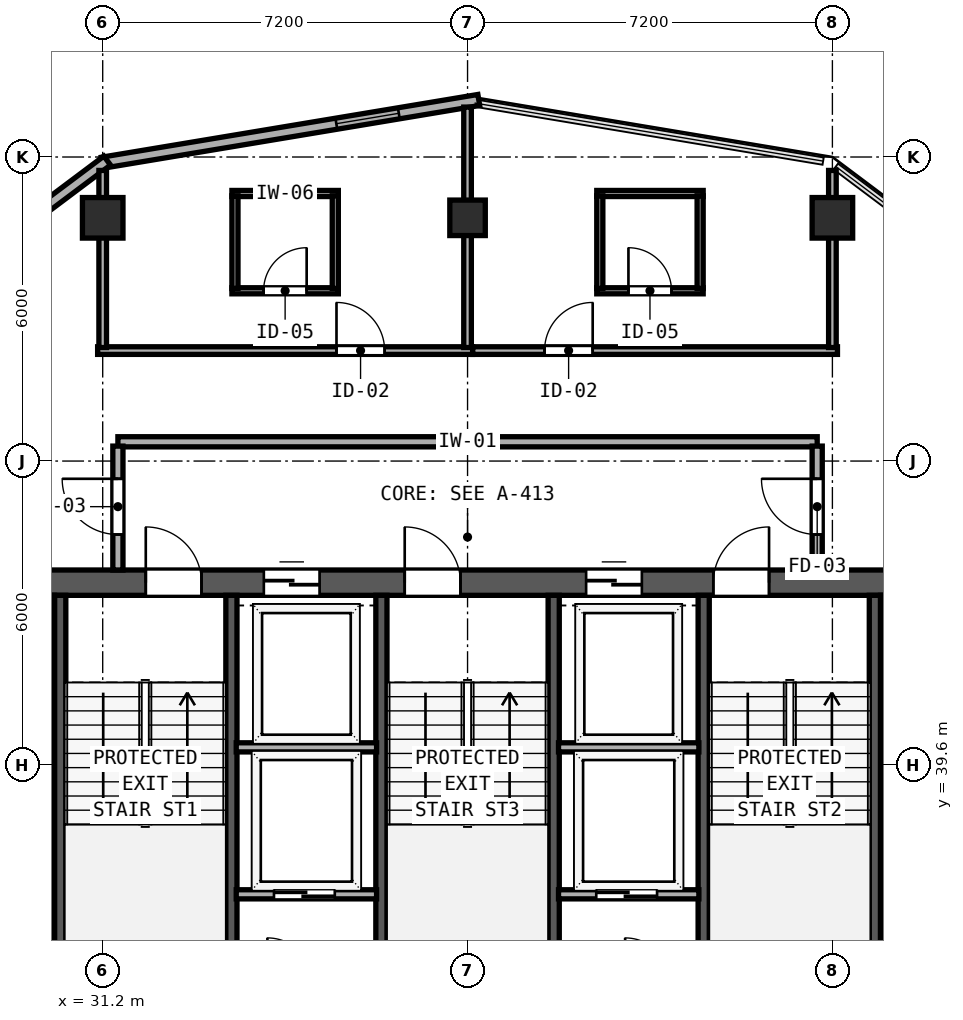
"""IFC4 building model, lengths in metres.
Left out: names, types, materials, properties, quantities, classifications, styles, units other than length and angle.
Written with IfcOpenShell. Run it as: python <this file> out.ifc"""

import sys

from ifc_helpers import new_model, si_unit, direction, frame, frame_2d, origin, origin_2d, place, context, subcontext, project, spatial, rectangle, hollow_rectangle, extrude, element, fill, save


model = new_model("IFC4")
c1 = context("Model", 3, precision=1e-05, world=origin(), true_north=direction((0.0, 1.0)))
c2 = subcontext(c1, "Body", "Model", "MODEL_VIEW")
j1 = project(units=[si_unit("LENGTHUNIT", "METRE"), si_unit("PLANEANGLEUNIT", "RADIAN")], contexts=[c1])
p1 = place(None, origin())
s1 = spatial("IfcSite", under=j1, at=p1, CompositionType="ELEMENT")
p2 = place(p1, origin())
s2 = spatial("IfcBuilding", under=s1, at=p2, CompositionType="ELEMENT")
p3 = place(p2, frame((0.0, 0.0, 258.3)))
s3 = spatial("IfcBuildingStorey", under=s2, at=p3, CompositionType="ELEMENT", Elevation=258.3)
p4 = place(p3, frame((29.75, 43.2, 0.0), z_axis=(0.0, 0.0, 1.0), x_axis=(1.0, 0.0, 0.0)))
e1 = element("IfcWall", 1, at=p4, inside=s3, PredefinedType="SHEAR", context=c2, shape_type="SweptSolid", body=[
    extrude(rectangle(XDim=17.3, YDim=0.5, at=frame_2d((8.65, 0.0))), origin(), (0.0, 0.0, 1.0), 3.67),
])
p5 = place(p4, frame((2.3, 0.0, 0.0)))
e2 = element("IfcOpeningElement", 2, at=p5, cuts=e1, PredefinedType="OPENING", context=c2, shape_type="SweptSolid", body=[
    extrude(rectangle(XDim=1.1, YDim=2.15, at=frame_2d((0.55, 1.075))), frame((0.0, 0.26, 0.0), z_axis=(0.0, -1.0, 0.0), x_axis=(1.0, 0.0, 0.0)), (0.0, 0.0, 1.0), 0.52),
])
p6 = place(p4, frame((7.41, 0.0, 0.0)))
e3 = element("IfcOpeningElement", 3, at=p6, cuts=e1, PredefinedType="OPENING", context=c2, shape_type="SweptSolid", body=[
    extrude(rectangle(XDim=1.1, YDim=2.15, at=frame_2d((0.55, 1.075))), frame((0.0, 0.26, 0.0), z_axis=(0.0, -1.0, 0.0), x_axis=(1.0, 0.0, 0.0)), (0.0, 0.0, 1.0), 0.52),
])
p7 = place(p4, frame((13.5, 0.0, 0.0)))
e4 = element("IfcOpeningElement", 4, at=p7, cuts=e1, PredefinedType="OPENING", context=c2, shape_type="SweptSolid", body=[
    extrude(rectangle(XDim=1.1, YDim=2.15, at=frame_2d((0.55, 1.075))), frame((0.0, 0.26, 0.0), z_axis=(0.0, -1.0, 0.0), x_axis=(1.0, 0.0, 0.0)), (0.0, 0.0, 1.0), 0.52),
])
p8 = place(p4, frame((4.63, 0.0, 0.0)))
e5 = element("IfcOpeningElement", 5, at=p8, cuts=e1, PredefinedType="OPENING", context=c2, shape_type="SweptSolid", body=[
    extrude(rectangle(XDim=1.1, YDim=2.2, at=frame_2d((0.55, 1.1))), frame((0.0, 0.26, 0.0), z_axis=(0.0, -1.0, 0.0), x_axis=(1.0, 0.0, 0.0)), (0.0, 0.0, 1.0), 0.52),
])
p9 = place(p4, frame((10.99, 0.0, 0.0)))
e6 = element("IfcOpeningElement", 6, at=p9, cuts=e1, PredefinedType="OPENING", context=c2, shape_type="SweptSolid", body=[
    extrude(rectangle(XDim=1.1, YDim=2.2, at=frame_2d((0.55, 1.1))), frame((0.0, 0.26, 0.0), z_axis=(0.0, -1.0, 0.0), x_axis=(1.0, 0.0, 0.0)), (0.0, 0.0, 1.0), 0.52),
])
for number, where, z_axis, x_axis in (
    (7, (30.0, 32.8, 0.0), (0.0, 0.0, 1.0), (0.0, 1.0, 0.0)),
    (8, (46.8, 32.8, 0.0), (0.0, 0.0, 1.0), (0.0, 1.0, 0.0)),
):
    element("IfcWall", number, at=place(p3, frame(where, z_axis=z_axis, x_axis=x_axis)), inside=s3, PredefinedType="SHEAR", context=c2, shape_type="SweptSolid", body=[
        extrude(rectangle(XDim=10.15, YDim=0.5, at=frame_2d((5.075, 0.0))), origin(), (0.0, 0.0, 1.0), 3.67),
    ])
for number, where, z_axis, x_axis in (
    (9, (30.362, 35.39, 0.0), (0.0, 0.0, 1.0), (0.0, 1.0, 0.0)),
    (10, (33.74, 35.39, 0.0), (0.0, 0.0, 1.0), (0.0, 1.0, 0.0)),
    (11, (36.7, 35.39, 0.0), (0.0, 0.0, 1.0), (0.0, 1.0, 0.0)),
    (12, (40.1, 35.39, 0.0), (0.0, 0.0, 1.0), (0.0, 1.0, 0.0)),
    (13, (43.06, 35.39, 0.0), (0.0, 0.0, 1.0), (0.0, 1.0, 0.0)),
    (14, (46.438, 35.39, 0.0), (0.0, 0.0, 1.0), (0.0, 1.0, 0.0)),
):
    element("IfcWall", number, at=place(p3, frame(where, z_axis=z_axis, x_axis=x_axis)), inside=s3, PredefinedType="SHEAR", context=c2, shape_type="SweptSolid", body=[
        extrude(rectangle(XDim=7.56, YDim=0.22, at=frame_2d((3.78, 0.0))), origin(), (0.0, 0.0, 1.0), 3.67),
    ])
for number, where, z_axis, x_axis in (
    (15, (31.2, 50.4, 0.0), (0.0, 0.0, 1.0), (1.0, 0.0, 0.0)),
    (16, (45.6, 50.4, 0.0), (0.0, 0.0, 1.0), (1.0, 0.0, 0.0)),
):
    element("IfcColumn", number, at=place(p3, frame(where, z_axis=z_axis, x_axis=x_axis)), inside=s3, PredefinedType="COLUMN", context=c2, shape_type="SweptSolid", body=[
        extrude(hollow_rectangle(XDim=0.8, YDim=0.8, WallThickness=0.03, at=origin_2d()), origin(), (0.0, 0.0, 1.0), 3.85),
    ])
p10 = place(p3, frame((38.4, 50.4, 0.0), z_axis=(0.0, 0.0, 1.0), x_axis=(1.0, 0.0, 0.0)))
e17 = element("IfcColumn", 17, at=p10, inside=s3, PredefinedType="COLUMN", context=c2, shape_type="SweptSolid", body=[
    extrude(hollow_rectangle(XDim=0.7, YDim=0.7, WallThickness=0.026, at=origin_2d()), origin(), (0.0, 0.0, 1.0), 3.85),
])
p11 = place(p3, frame((38.622, 52.726, 0.0), z_axis=(0.0, 0.0, 1.0), x_axis=(-0.986390420428, -0.164420006349, 0.0)))
e18 = element("IfcWall", 18, at=p11, inside=s3, PredefinedType="SOLIDWALL", context=c2, shape_type="SweptSolid", body=[
    extrude(rectangle(XDim=7.534, YDim=0.22, at=frame_2d((3.767, 0.0))), origin(), (0.0, 0.0, 1.0), 3.67),
])
p12 = place(p11, frame((1.6, 0.0, 0.85)))
e19 = element("IfcOpeningElement", 19, at=p12, cuts=e18, PredefinedType="OPENING", context=c2, shape_type="SweptSolid", body=[
    extrude(rectangle(XDim=1.25, YDim=1.95, at=frame_2d((0.625, 0.975))), frame((0.0, 0.12, 0.0), z_axis=(0.0, -1.0, 0.0), x_axis=(1.0, 0.0, 0.0)), (0.0, 0.0, 1.0), 0.24),
])
p13 = place(p3, frame((31.289, 51.529, 0.0), z_axis=(0.0, 0.0, 1.0), x_axis=(-0.800014580093, -0.599980559383, 0.0)))
e20 = element("IfcWall", 20, at=p13, inside=s3, PredefinedType="SOLIDWALL", context=c2, shape_type="SweptSolid", body=[
    extrude(rectangle(XDim=6.028, YDim=0.22, at=frame_2d((3.014, 0.0))), origin(), (0.0, 0.0, 1.0), 3.67),
])
p14 = place(p13, frame((1.6, 0.0, 0.85)))
e21 = element("IfcOpeningElement", 21, at=p14, cuts=e20, PredefinedType="OPENING", context=c2, shape_type="SweptSolid", body=[
    extrude(rectangle(XDim=1.25, YDim=1.95, at=frame_2d((0.625, 0.975))), frame((0.0, 0.12, 0.0), z_axis=(0.0, -1.0, 0.0), x_axis=(1.0, 0.0, 0.0)), (0.0, 0.0, 1.0), 0.24),
])
p15 = place(p3, frame((31.5, 45.98, 0.0), z_axis=(0.0, 0.0, 1.0), x_axis=(1.0, 0.0, 0.0)))
e22 = element("IfcWall", 22, at=p15, inside=s3, PredefinedType="SOLIDWALL", context=c2, shape_type="SweptSolid", body=[
    extrude(rectangle(XDim=13.8, YDim=0.2, at=frame_2d((6.9, 0.0))), origin(), (0.0, 0.0, 1.0), 3.67),
])
p16 = place(p3, frame((31.5, 43.45, 0.0), z_axis=(0.0, 0.0, 1.0), x_axis=(0.0, 1.0, 0.0)))
e23 = element("IfcWall", 23, at=p16, inside=s3, PredefinedType="SOLIDWALL", context=c2, shape_type="SweptSolid", body=[
    extrude(rectangle(XDim=2.445, YDim=0.2, at=frame_2d((1.223, 0.0))), origin(), (0.0, 0.0, 1.0), 3.67),
])
p17 = place(p16, frame((1.8, 0.0, 0.0), z_axis=(0.0, 0.0, 1.0), x_axis=(-1.0, 0.0, 0.0)))
e24 = element("IfcOpeningElement", 24, at=p17, cuts=e23, PredefinedType="OPENING", context=c2, shape_type="SweptSolid", body=[
    extrude(rectangle(XDim=1.1, YDim=2.15, at=frame_2d((0.55, 1.075))), frame((0.0, 0.11, 0.0), z_axis=(0.0, -1.0, 0.0), x_axis=(1.0, 0.0, 0.0)), (0.0, 0.0, 1.0), 0.22),
])
p18 = place(p3, frame((45.3, 43.45, 0.0), z_axis=(0.0, 0.0, 1.0), x_axis=(0.0, 1.0, 0.0)))
e25 = element("IfcWall", 25, at=p18, inside=s3, PredefinedType="SOLIDWALL", context=c2, shape_type="SweptSolid", body=[
    extrude(rectangle(XDim=2.445, YDim=0.2, at=frame_2d((1.223, 0.0))), origin(), (0.0, 0.0, 1.0), 3.67),
])
p19 = place(p18, frame((0.7, 0.0, 0.0)))
e26 = element("IfcOpeningElement", 26, at=p19, cuts=e25, PredefinedType="OPENING", context=c2, shape_type="SweptSolid", body=[
    extrude(rectangle(XDim=1.1, YDim=2.15, at=frame_2d((0.55, 1.075))), frame((0.0, 0.11, 0.0), z_axis=(0.0, -1.0, 0.0), x_axis=(1.0, 0.0, 0.0)), (0.0, 0.0, 1.0), 0.22),
])
for number, where, z_axis, x_axis in (
    (27, (33.835, 39.95, 0.0), (0.0, 0.0, 1.0), (1.0, 0.0, 0.0)),
    (28, (40.195, 39.95, 0.0), (0.0, 0.0, 1.0), (1.0, 0.0, 0.0)),
):
    element("IfcWall", number, at=place(p3, frame(where, z_axis=z_axis, x_axis=x_axis)), inside=s3, PredefinedType="SOLIDWALL", context=c2, shape_type="SweptSolid", body=[
        extrude(rectangle(XDim=2.77, YDim=0.18, at=frame_2d((1.385, 0.0))), origin(), (0.0, 0.0, 1.0), 3.67),
    ])
p20 = place(p3, frame((33.835, 37.05, 0.0), z_axis=(0.0, 0.0, 1.0), x_axis=(1.0, 0.0, 0.0)))
e29 = element("IfcWall", 29, at=p20, inside=s3, PredefinedType="SOLIDWALL", context=c2, shape_type="SweptSolid", body=[
    extrude(rectangle(XDim=2.77, YDim=0.18, at=frame_2d((1.385, 0.0))), origin(), (0.0, 0.0, 1.0), 3.67),
])
p21 = place(p20, frame((1.945, 0.0, 0.0), z_axis=(0.0, 0.0, 1.0), x_axis=(-1.0, 0.0, 0.0)))
e30 = element("IfcOpeningElement", 30, at=p21, cuts=e29, PredefinedType="OPENING", context=c2, shape_type="SweptSolid", body=[
    extrude(rectangle(XDim=1.2, YDim=2.2, at=frame_2d((0.6, 1.1))), frame((0.0, 0.1, 0.0), z_axis=(0.0, -1.0, 0.0), x_axis=(1.0, 0.0, 0.0)), (0.0, 0.0, 1.0), 0.2),
])
p22 = place(p3, frame((40.195, 37.05, 0.0), z_axis=(0.0, 0.0, 1.0), x_axis=(1.0, 0.0, 0.0)))
e31 = element("IfcWall", 31, at=p22, inside=s3, PredefinedType="SOLIDWALL", context=c2, shape_type="SweptSolid", body=[
    extrude(rectangle(XDim=2.77, YDim=0.18, at=frame_2d((1.385, 0.0))), origin(), (0.0, 0.0, 1.0), 3.67),
])
p23 = place(p22, frame((1.945, 0.0, 0.0), z_axis=(0.0, 0.0, 1.0), x_axis=(-1.0, 0.0, 0.0)))
e32 = element("IfcOpeningElement", 32, at=p23, cuts=e31, PredefinedType="OPENING", context=c2, shape_type="SweptSolid", body=[
    extrude(rectangle(XDim=1.2, YDim=2.2, at=frame_2d((0.6, 1.1))), frame((0.0, 0.1, 0.0), z_axis=(0.0, -1.0, 0.0), x_axis=(1.0, 0.0, 0.0)), (0.0, 0.0, 1.0), 0.2),
])
p24 = place(p3, frame((31.1, 47.78, 0.0), z_axis=(0.0, 0.0, 1.0), x_axis=(1.0, 0.0, 0.0)))
e33 = element("IfcWall", 33, at=p24, inside=s3, PredefinedType="PARTITIONING", context=c2, shape_type="SweptSolid", body=[
    extrude(rectangle(XDim=7.4, YDim=0.15, at=frame_2d((3.7, 0.0))), origin(), (0.0, 0.0, 1.0), 3.67),
])
p25 = place(p24, frame((4.714, 0.0, 0.0)))
e34 = element("IfcOpeningElement", 34, at=p25, cuts=e33, PredefinedType="OPENING", context=c2, shape_type="SweptSolid", body=[
    extrude(rectangle(XDim=0.95, YDim=2.15, at=frame_2d((0.475, 1.075))), frame((0.0, 0.085, 0.0), z_axis=(0.0, -1.0, 0.0), x_axis=(1.0, 0.0, 0.0)), (0.0, 0.0, 1.0), 0.17),
])
p26 = place(p3, frame((31.2, 47.84, 0.0), z_axis=(0.0, 0.0, 1.0), x_axis=(0.0, 1.0, 0.0)))
e35 = element("IfcWall", 35, at=p26, inside=s3, PredefinedType="PARTITIONING", context=c2, shape_type="SweptSolid", body=[
    extrude(rectangle(XDim=3.495, YDim=0.15, at=frame_2d((1.748, 0.0))), origin(), (0.0, 0.0, 1.0), 3.205),
])
p27 = place(p3, frame((38.4, 47.84, 0.0), z_axis=(0.0, 0.0, 1.0), x_axis=(0.0, 1.0, 0.0)))
e36 = element("IfcWall", 36, at=p27, inside=s3, PredefinedType="PARTITIONING", context=c2, shape_type="SweptSolid", body=[
    extrude(rectangle(XDim=4.745, YDim=0.15, at=frame_2d((2.373, 0.0))), origin(), (0.0, 0.0, 1.0), 3.67),
])
p28 = place(p3, frame((33.75, 50.88, 0.0), z_axis=(0.0, 0.0, 1.0), x_axis=(1.0, 0.0, 0.0)))
e37 = element("IfcWall", 37, at=p28, inside=s3, PredefinedType="PARTITIONING", context=c2, shape_type="SweptSolid", body=[
    extrude(rectangle(XDim=2.1, YDim=0.12, at=frame_2d((1.05, 0.0))), origin(), (0.0, 0.0, 1.0), 3.67),
])
p29 = place(p3, frame((33.75, 48.96, 0.0), z_axis=(0.0, 0.0, 1.0), x_axis=(1.0, 0.0, 0.0)))
e38 = element("IfcWall", 38, at=p29, inside=s3, PredefinedType="PARTITIONING", context=c2, shape_type="SweptSolid", body=[
    extrude(rectangle(XDim=2.1, YDim=0.12, at=frame_2d((1.05, 0.0))), origin(), (0.0, 0.0, 1.0), 3.67),
])
p30 = place(p29, frame((0.625, 0.0, 0.0)))
e39 = element("IfcOpeningElement", 39, at=p30, cuts=e38, PredefinedType="OPENING", context=c2, shape_type="SweptSolid", body=[
    extrude(rectangle(XDim=0.85, YDim=2.1, at=frame_2d((0.425, 1.05))), frame((0.0, 0.07, 0.0), z_axis=(0.0, -1.0, 0.0), x_axis=(1.0, 0.0, 0.0)), (0.0, 0.0, 1.0), 0.14),
])
for number, where, z_axis, x_axis in (
    (40, (33.81, 49.005, 0.0), (0.0, 0.0, 1.0), (0.0, 1.0, 0.0)),
    (41, (35.79, 49.005, 0.0), (0.0, 0.0, 1.0), (0.0, 1.0, 0.0)),
):
    element("IfcWall", number, at=place(p3, frame(where, z_axis=z_axis, x_axis=x_axis)), inside=s3, PredefinedType="PARTITIONING", context=c2, shape_type="SweptSolid", body=[
        extrude(rectangle(XDim=1.83, YDim=0.12, at=frame_2d((0.915, 0.0))), origin(), (0.0, 0.0, 1.0), 3.67),
    ])
p31 = place(p3, frame((38.502, 47.78, 0.0), z_axis=(0.0, 0.0, 1.0), x_axis=(1.0, 0.0, 0.0)))
e42 = element("IfcWall", 42, at=p31, inside=s3, PredefinedType="PARTITIONING", context=c2, shape_type="SweptSolid", body=[
    extrude(rectangle(XDim=7.198, YDim=0.15, at=frame_2d((3.599, 0.0))), origin(), (0.0, 0.0, 1.0), 3.67),
])
p32 = place(p31, frame((1.417, 0.0, 0.0)))
e43 = element("IfcOpeningElement", 43, at=p32, cuts=e42, PredefinedType="OPENING", context=c2, shape_type="SweptSolid", body=[
    extrude(rectangle(XDim=0.95, YDim=2.15, at=frame_2d((0.475, 1.075))), frame((0.0, 0.085, 0.0), z_axis=(0.0, -1.0, 0.0), x_axis=(1.0, 0.0, 0.0)), (0.0, 0.0, 1.0), 0.17),
])
p33 = place(p3, frame((45.6, 47.84, 0.0), z_axis=(0.0, 0.0, 1.0), x_axis=(0.0, 1.0, 0.0)))
e44 = element("IfcWall", 44, at=p33, inside=s3, PredefinedType="PARTITIONING", context=c2, shape_type="SweptSolid", body=[
    extrude(rectangle(XDim=3.495, YDim=0.15, at=frame_2d((1.748, 0.0))), origin(), (0.0, 0.0, 1.0), 3.205),
])
p34 = place(p3, frame((40.95, 50.88, 0.0), z_axis=(0.0, 0.0, 1.0), x_axis=(1.0, 0.0, 0.0)))
e45 = element("IfcWall", 45, at=p34, inside=s3, PredefinedType="PARTITIONING", context=c2, shape_type="SweptSolid", body=[
    extrude(rectangle(XDim=2.1, YDim=0.12, at=frame_2d((1.05, 0.0))), origin(), (0.0, 0.0, 1.0), 3.67),
])
p35 = place(p3, frame((40.95, 48.96, 0.0), z_axis=(0.0, 0.0, 1.0), x_axis=(1.0, 0.0, 0.0)))
e46 = element("IfcWall", 46, at=p35, inside=s3, PredefinedType="PARTITIONING", context=c2, shape_type="SweptSolid", body=[
    extrude(rectangle(XDim=2.1, YDim=0.12, at=frame_2d((1.05, 0.0))), origin(), (0.0, 0.0, 1.0), 3.67),
])
p36 = place(p35, frame((0.625, 0.0, 0.0)))
e47 = element("IfcOpeningElement", 47, at=p36, cuts=e46, PredefinedType="OPENING", context=c2, shape_type="SweptSolid", body=[
    extrude(rectangle(XDim=0.85, YDim=2.1, at=frame_2d((0.425, 1.05))), frame((0.0, 0.07, 0.0), z_axis=(0.0, -1.0, 0.0), x_axis=(1.0, 0.0, 0.0)), (0.0, 0.0, 1.0), 0.14),
])
for number, where, z_axis, x_axis in (
    (48, (41.01, 49.005, 0.0), (0.0, 0.0, 1.0), (0.0, 1.0, 0.0)),
    (49, (42.99, 49.005, 0.0), (0.0, 0.0, 1.0), (0.0, 1.0, 0.0)),
):
    element("IfcWall", number, at=place(p3, frame(where, z_axis=z_axis, x_axis=x_axis)), inside=s3, PredefinedType="PARTITIONING", context=c2, shape_type="SweptSolid", body=[
        extrude(rectangle(XDim=1.83, YDim=0.12, at=frame_2d((0.915, 0.0))), origin(), (0.0, 0.0, 1.0), 3.67),
    ])
p37 = place(p12, origin())
e50 = element("IfcWindow", 50, at=p37, inside=s3, PartitioningType="SINGLE_PANEL", PredefinedType="WINDOW", context=c2, shape_type="SweptSolid", body=[
    extrude(rectangle(XDim=1.25, YDim=1.95, at=frame_2d((0.625, 0.975))), frame((0.0, 0.03, 0.0), z_axis=(0.0, -1.0, 0.0), x_axis=(1.0, 0.0, 0.0)), (0.0, 0.0, 1.0), 0.06),
])
fill(e19, e50)
p38 = place(p5, origin())
e51 = element("IfcDoor", 51, at=p38, inside=s3, OperationType="SINGLE_SWING_LEFT", PredefinedType="DOOR", context=c2, shape_type="SweptSolid", body=[
    extrude(rectangle(XDim=1.1, YDim=2.15, at=frame_2d((0.55, 1.075))), frame((0.0, 0.185, 0.0), z_axis=(0.0, -1.0, 0.0), x_axis=(1.0, 0.0, 0.0)), (0.0, 0.0, 1.0), 0.05),
])
fill(e2, e51)
p39 = place(p6, origin())
e52 = element("IfcDoor", 52, at=p39, inside=s3, OperationType="SINGLE_SWING_LEFT", PredefinedType="DOOR", context=c2, shape_type="SweptSolid", body=[
    extrude(rectangle(XDim=1.1, YDim=2.15, at=frame_2d((0.55, 1.075))), frame((0.0, 0.185, 0.0), z_axis=(0.0, -1.0, 0.0), x_axis=(1.0, 0.0, 0.0)), (0.0, 0.0, 1.0), 0.05),
])
fill(e3, e52)
p40 = place(p7, origin())
e53 = element("IfcDoor", 53, at=p40, inside=s3, OperationType="SINGLE_SWING_RIGHT", PredefinedType="DOOR", context=c2, shape_type="SweptSolid", body=[
    extrude(rectangle(XDim=1.1, YDim=2.15, at=frame_2d((0.55, 1.075))), frame((0.0, 0.185, 0.0), z_axis=(0.0, -1.0, 0.0), x_axis=(1.0, 0.0, 0.0)), (0.0, 0.0, 1.0), 0.05),
])
fill(e4, e53)
p41 = place(p17, origin())
e54 = element("IfcDoor", 54, at=p41, inside=s3, OperationType="SINGLE_SWING_LEFT", PredefinedType="DOOR", context=c2, shape_type="SweptSolid", body=[
    extrude(rectangle(XDim=1.1, YDim=2.15, at=frame_2d((0.55, 1.075))), frame((0.0, 0.025, 0.0), z_axis=(0.0, -1.0, 0.0), x_axis=(1.0, 0.0, 0.0)), (0.0, 0.0, 1.0), 0.05),
])
fill(e24, e54)
p42 = place(p19, origin())
e55 = element("IfcDoor", 55, at=p42, inside=s3, OperationType="SINGLE_SWING_RIGHT", PredefinedType="DOOR", context=c2, shape_type="SweptSolid", body=[
    extrude(rectangle(XDim=1.1, YDim=2.15, at=frame_2d((0.55, 1.075))), frame((0.0, 0.025, 0.0), z_axis=(0.0, -1.0, 0.0), x_axis=(1.0, 0.0, 0.0)), (0.0, 0.0, 1.0), 0.05),
])
fill(e26, e55)
p43 = place(p8, origin())
e56 = element("IfcDoor", 56, at=p43, inside=s3, OperationType="SLIDING_TO_LEFT", PredefinedType="DOOR", context=c2, shape_type="SweptSolid", body=[
    extrude(rectangle(XDim=1.1, YDim=2.2, at=frame_2d((0.55, 1.1))), frame((0.0, 0.185, 0.0), z_axis=(0.0, -1.0, 0.0), x_axis=(1.0, 0.0, 0.0)), (0.0, 0.0, 1.0), 0.05),
])
fill(e5, e56)
p44 = place(p9, origin())
e57 = element("IfcDoor", 57, at=p44, inside=s3, OperationType="SLIDING_TO_LEFT", PredefinedType="DOOR", context=c2, shape_type="SweptSolid", body=[
    extrude(rectangle(XDim=1.1, YDim=2.2, at=frame_2d((0.55, 1.1))), frame((0.0, 0.185, 0.0), z_axis=(0.0, -1.0, 0.0), x_axis=(1.0, 0.0, 0.0)), (0.0, 0.0, 1.0), 0.05),
])
fill(e6, e57)
p45 = place(p21, origin())
e58 = element("IfcDoor", 58, at=p45, inside=s3, OperationType="SLIDING_TO_RIGHT", PredefinedType="DOOR", context=c2, shape_type="SweptSolid", body=[
    extrude(rectangle(XDim=1.2, YDim=2.2, at=frame_2d((0.6, 1.1))), frame((0.0, 0.025, 0.0), z_axis=(0.0, -1.0, 0.0), x_axis=(1.0, 0.0, 0.0)), (0.0, 0.0, 1.0), 0.05),
])
fill(e30, e58)
p46 = place(p23, origin())
e59 = element("IfcDoor", 59, at=p46, inside=s3, OperationType="SLIDING_TO_RIGHT", PredefinedType="DOOR", context=c2, shape_type="SweptSolid", body=[
    extrude(rectangle(XDim=1.2, YDim=2.2, at=frame_2d((0.6, 1.1))), frame((0.0, 0.025, 0.0), z_axis=(0.0, -1.0, 0.0), x_axis=(1.0, 0.0, 0.0)), (0.0, 0.0, 1.0), 0.05),
])
fill(e32, e59)
p47 = place(p25, origin())
e60 = element("IfcDoor", 60, at=p47, inside=s3, OperationType="SINGLE_SWING_LEFT", PredefinedType="DOOR", context=c2, shape_type="SweptSolid", body=[
    extrude(rectangle(XDim=0.95, YDim=2.15, at=frame_2d((0.475, 1.075))), frame((0.0, 0.025, 0.0), z_axis=(0.0, -1.0, 0.0), x_axis=(1.0, 0.0, 0.0)), (0.0, 0.0, 1.0), 0.05),
])
fill(e34, e60)
p48 = place(p30, origin())
e61 = element("IfcDoor", 61, at=p48, inside=s3, OperationType="SINGLE_SWING_RIGHT", PredefinedType="DOOR", context=c2, shape_type="SweptSolid", body=[
    extrude(rectangle(XDim=0.85, YDim=2.1, at=frame_2d((0.425, 1.05))), frame((0.0, 0.025, 0.0), z_axis=(0.0, -1.0, 0.0), x_axis=(1.0, 0.0, 0.0)), (0.0, 0.0, 1.0), 0.05),
])
fill(e39, e61)
p49 = place(p32, origin())
e62 = element("IfcDoor", 62, at=p49, inside=s3, OperationType="SINGLE_SWING_RIGHT", PredefinedType="DOOR", context=c2, shape_type="SweptSolid", body=[
    extrude(rectangle(XDim=0.95, YDim=2.15, at=frame_2d((0.475, 1.075))), frame((0.0, 0.025, 0.0), z_axis=(0.0, -1.0, 0.0), x_axis=(1.0, 0.0, 0.0)), (0.0, 0.0, 1.0), 0.05),
])
fill(e43, e62)
p50 = place(p36, origin())
e63 = element("IfcDoor", 63, at=p50, inside=s3, OperationType="SINGLE_SWING_LEFT", PredefinedType="DOOR", context=c2, shape_type="SweptSolid", body=[
    extrude(rectangle(XDim=0.85, YDim=2.1, at=frame_2d((0.425, 1.05))), frame((0.0, 0.025, 0.0), z_axis=(0.0, -1.0, 0.0), x_axis=(1.0, 0.0, 0.0)), (0.0, 0.0, 1.0), 0.05),
])
fill(e47, e63)
save(model, sys.argv[1])
